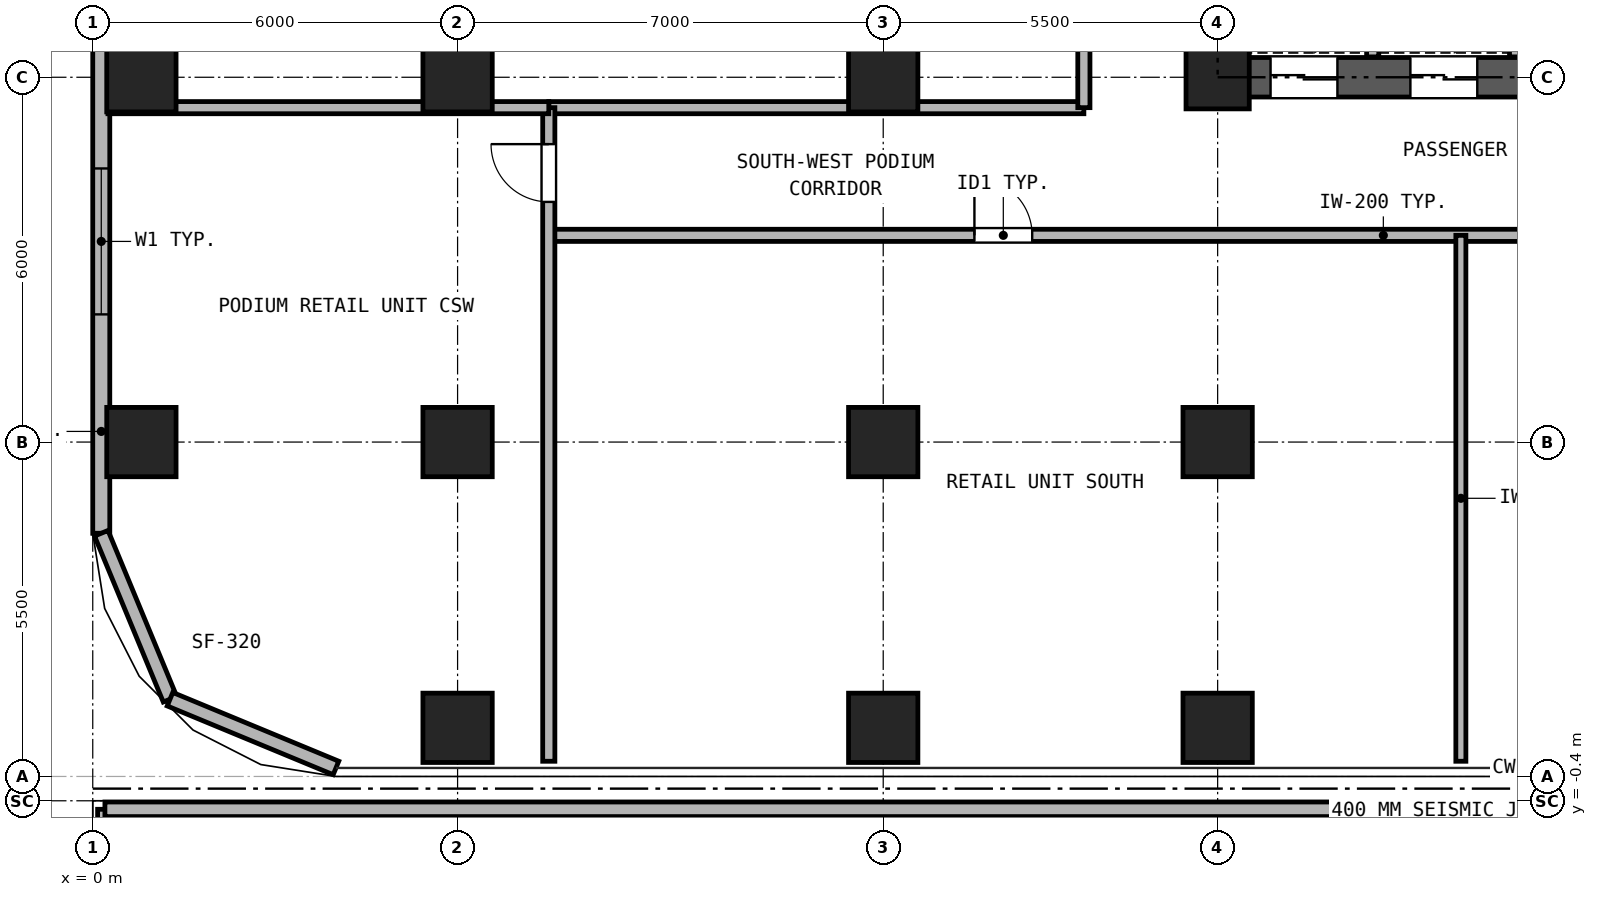
"""IFC4 building model, lengths in metres.
Left out: names, types, materials, properties, quantities, classifications, styles, units other than length and angle.
Written with IfcOpenShell. Run it as: python <this file> out.ifc"""

import sys

from ifc_helpers import new_model, si_unit, direction, frame, frame_2d, origin, origin_2d, place, context, subcontext, project, spatial, rectangle, hollow_rectangle, extrude, source, transform, mapped, element, fill, save


model = new_model("IFC4")
c1 = context("Model", 3, precision=1e-05, world=origin(), true_north=direction((0.0, 1.0)))
c2 = subcontext(c1, "Body", "Model", "MODEL_VIEW")
j1 = project(units=[si_unit("LENGTHUNIT", "METRE"), si_unit("PLANEANGLEUNIT", "RADIAN")], contexts=[c1])
p1 = place(None, origin())
s1 = spatial("IfcSite", under=j1, at=p1, CompositionType="ELEMENT")
p2 = place(p1, origin())
s2 = spatial("IfcBuilding", under=s1, at=p2, CompositionType="ELEMENT")
p3 = place(p2, frame((0.0, 0.0, 4.5)))
s3 = spatial("IfcBuildingStorey", under=s2, at=p3, CompositionType="ELEMENT", Elevation=4.5)
m1 = source(origin(), c2, "Body", "SweptSolid", [
    extrude(hollow_rectangle(XDim=1.14, YDim=1.14, WallThickness=0.07, at=origin_2d()), origin(), (0.0, 0.0, 1.0), 4.18),
])
for number, where, z_axis, x_axis in (
    (1, (6.0, 0.8, 0.0), (0.0, 0.0, 1.0), (1.0, 0.0, 0.0)),
    (2, (13.0, 0.8, 0.0), (0.0, 0.0, 1.0), (1.0, 0.0, 0.0)),
    (3, (18.5, 0.8, 0.0), (0.0, 0.0, 1.0), (1.0, 0.0, 0.0)),
    (4, (0.8, 5.5, 0.0), (0.0, 0.0, 1.0), (1.0, 0.0, 0.0)),
    (5, (0.8, 11.5, 0.0), (0.0, 0.0, 1.0), (1.0, 0.0, 0.0)),
    (6, (6.0, 5.5, 0.0), (0.0, 0.0, 1.0), (1.0, 0.0, 0.0)),
    (7, (6.0, 11.5, 0.0), (0.0, 0.0, 1.0), (1.0, 0.0, 0.0)),
    (8, (13.0, 5.5, 0.0), (0.0, 0.0, 1.0), (1.0, 0.0, 0.0)),
    (9, (13.0, 11.5, 0.0), (0.0, 0.0, 1.0), (1.0, 0.0, 0.0)),
    (10, (18.5, 5.5, 0.0), (0.0, 0.0, 1.0), (1.0, 0.0, 0.0)),
):
    element("IfcColumn", number, at=place(p3, frame(where, z_axis=z_axis, x_axis=x_axis)), inside=s3, PredefinedType="COLUMN", context=c2, shape_type="MappedRepresentation", body=[
        mapped(m1, transform((0.0, 0.0, 0.0), x_axis=(1.0, 0.0, 0.0), y_axis=(0.0, 1.0, 0.0), z_axis=(0.0, 0.0, 1.0), scale=1.0)),
    ])
m2 = source(origin(), c2, "Body", "SweptSolid", [
    extrude(hollow_rectangle(XDim=1.04, YDim=1.04, WallThickness=0.065, at=origin_2d()), origin(), (0.0, 0.0, 1.0), 4.18),
])
p4 = place(p3, frame((18.5, 11.5, 0.0), z_axis=(0.0, 0.0, 1.0), x_axis=(1.0, 0.0, 0.0)))
e11 = element("IfcColumn", 11, at=p4, inside=s3, PredefinedType="COLUMN", context=c2, shape_type="MappedRepresentation", body=[
    mapped(m2, transform((0.0, 0.0, 0.0), x_axis=(1.0, 0.0, 0.0), y_axis=(0.0, 1.0, 0.0), z_axis=(0.0, 0.0, 1.0), scale=1.0)),
])
p5 = place(p3, frame((0.14, 4.0, 0.0), z_axis=(0.0, 0.0, 1.0), x_axis=(0.0, 1.0, 0.0)))
e12 = element("IfcWall", 12, at=p5, inside=s3, PredefinedType="SOLIDWALL", context=c2, shape_type="SweptSolid", body=[
    extrude(rectangle(XDim=32.5, YDim=0.28, at=frame_2d((16.25, 0.0))), origin(), (0.0, 0.0, 1.0), 4.18),
])
p6 = place(p5, frame((3.6, 0.0, 0.9)))
e13 = element("IfcOpeningElement", 13, at=p6, cuts=e12, PredefinedType="OPENING", context=c2, shape_type="SweptSolid", body=[
    extrude(rectangle(XDim=2.4, YDim=2.1, at=frame_2d((1.2, 1.05))), frame((0.0, 0.15, 0.0), z_axis=(0.0, -1.0, 0.0), x_axis=(1.0, 0.0, 0.0)), (0.0, 0.0, 1.0), 0.3),
])
p7 = place(p5, frame((9.8, 0.0, 0.9)))
e14 = element("IfcOpeningElement", 14, at=p7, cuts=e12, PredefinedType="OPENING", context=c2, shape_type="SweptSolid", body=[
    extrude(rectangle(XDim=2.4, YDim=2.1, at=frame_2d((1.2, 1.05))), frame((0.0, 0.15, 0.0), z_axis=(0.0, -1.0, 0.0), x_axis=(1.0, 0.0, 0.0)), (0.0, 0.0, 1.0), 0.3),
])
p8 = place(p5, frame((15.4, 0.0, 0.9)))
e15 = element("IfcOpeningElement", 15, at=p8, cuts=e12, PredefinedType="OPENING", context=c2, shape_type="SweptSolid", body=[
    extrude(rectangle(XDim=2.4, YDim=2.1, at=frame_2d((1.2, 1.05))), frame((0.0, 0.15, 0.0), z_axis=(0.0, -1.0, 0.0), x_axis=(1.0, 0.0, 0.0)), (0.0, 0.0, 1.0), 0.3),
])
p9 = place(p5, frame((21.2, 0.0, 0.9)))
e16 = element("IfcOpeningElement", 16, at=p9, cuts=e12, PredefinedType="OPENING", context=c2, shape_type="SweptSolid", body=[
    extrude(rectangle(XDim=2.4, YDim=2.1, at=frame_2d((1.2, 1.05))), frame((0.0, 0.15, 0.0), z_axis=(0.0, -1.0, 0.0), x_axis=(1.0, 0.0, 0.0)), (0.0, 0.0, 1.0), 0.3),
])
p10 = place(p5, frame((26.8, 0.0, 0.9)))
e17 = element("IfcOpeningElement", 17, at=p10, cuts=e12, PredefinedType="OPENING", context=c2, shape_type="SweptSolid", body=[
    extrude(rectangle(XDim=2.4, YDim=2.1, at=frame_2d((1.2, 1.05))), frame((0.0, 0.15, 0.0), z_axis=(0.0, -1.0, 0.0), x_axis=(1.0, 0.0, 0.0)), (0.0, 0.0, 1.0), 0.3),
])
for number, where, z_axis, x_axis in (
    (18, (0.14, 4.0, 0.0), (0.0, 0.0, 1.0), (0.383, -0.924, 0.0)),
    (19, (1.271, 1.271, 0.0), (0.0, 0.0, 1.0), (0.924, -0.383, 0.0)),
):
    element("IfcWall", number, at=place(p3, frame(where, z_axis=z_axis, x_axis=x_axis)), inside=s3, PredefinedType="SOLIDWALL", context=c2, shape_type="SweptSolid", body=[
        extrude(rectangle(XDim=2.954, YDim=0.24, at=frame_2d((1.477, 0.0))), origin(), (0.0, 0.0, 1.0), 4.18),
    ])
p11 = place(p3, frame((0.2, -10.95, 0.0), z_axis=(0.0, 0.0, 1.0), x_axis=(0.0, 1.0, 0.0)))
e20 = element("IfcWall", 20, at=p11, inside=s3, PredefinedType="SOLIDWALL", context=c2, shape_type="SweptSolid", body=[
    extrude(rectangle(XDim=10.41, YDim=0.24, at=frame_2d((5.205, 0.0))), origin(), (0.0, 0.0, 1.0), 4.18),
])
p12 = place(p3, frame((0.2, -0.54, 0.0), z_axis=(0.0, 0.0, 1.0), x_axis=(1.0, 0.0, 0.0)))
e21 = element("IfcWall", 21, at=p12, inside=s3, PredefinedType="SOLIDWALL", context=c2, shape_type="SweptSolid", body=[
    extrude(rectangle(XDim=47.34, YDim=0.24, at=frame_2d((23.67, 0.0))), origin(), (0.0, 0.0, 1.0), 4.18),
])
p13 = place(p3, frame((18.175, 11.5, 0.0), z_axis=(0.0, 0.0, 1.0), x_axis=(1.0, 0.0, 0.0)))
e22 = element("IfcWall", 22, at=p13, inside=s3, PredefinedType="SHEAR", context=c2, shape_type="SweptSolid", body=[
    extrude(rectangle(XDim=10.65, YDim=0.65, at=frame_2d((5.325, 0.0))), origin(), (0.0, 0.0, 1.0), 4.18),
])
p14 = place(p13, frame((1.195, 0.0, 0.0)))
e23 = element("IfcOpeningElement", 23, at=p14, cuts=e22, PredefinedType="OPENING", context=c2, shape_type="SweptSolid", body=[
    extrude(rectangle(XDim=1.1, YDim=2.25, at=frame_2d((0.55, 1.125))), frame((0.0, 0.335, 0.0), z_axis=(0.0, -1.0, 0.0), x_axis=(1.0, 0.0, 0.0)), (0.0, 0.0, 1.0), 0.67),
])
p15 = place(p13, frame((3.495, 0.0, 0.0)))
e24 = element("IfcOpeningElement", 24, at=p15, cuts=e22, PredefinedType="OPENING", context=c2, shape_type="SweptSolid", body=[
    extrude(rectangle(XDim=1.1, YDim=2.25, at=frame_2d((0.55, 1.125))), frame((0.0, 0.335, 0.0), z_axis=(0.0, -1.0, 0.0), x_axis=(1.0, 0.0, 0.0)), (0.0, 0.0, 1.0), 0.67),
])
p16 = place(p13, frame((5.925, 0.0, 0.0)))
e25 = element("IfcOpeningElement", 25, at=p16, cuts=e22, PredefinedType="OPENING", context=c2, shape_type="SweptSolid", body=[
    extrude(rectangle(XDim=1.1, YDim=2.25, at=frame_2d((0.55, 1.125))), frame((0.0, 0.335, 0.0), z_axis=(0.0, -1.0, 0.0), x_axis=(1.0, 0.0, 0.0)), (0.0, 0.0, 1.0), 0.67),
])
p17 = place(p13, frame((8.325, 0.0, 0.0)))
e26 = element("IfcOpeningElement", 26, at=p17, cuts=e22, PredefinedType="OPENING", context=c2, shape_type="SweptSolid", body=[
    extrude(rectangle(XDim=1.1, YDim=2.25, at=frame_2d((0.55, 1.125))), frame((0.0, 0.335, 0.0), z_axis=(0.0, -1.0, 0.0), x_axis=(1.0, 0.0, 0.0)), (0.0, 0.0, 1.0), 0.67),
])
p18 = place(p3, frame((18.5, 11.825, 0.0), z_axis=(0.0, 0.0, 1.0), x_axis=(0.0, 1.0, 0.0)))
e27 = element("IfcWall", 27, at=p18, inside=s3, PredefinedType="SHEAR", context=c2, shape_type="SweptSolid", body=[
    extrude(rectangle(XDim=16.6, YDim=0.65, at=frame_2d((8.3, 0.0))), origin(), (0.0, 0.0, 1.0), 4.18),
])
p19 = place(p18, frame((7.325, 0.0, 0.0)))
e28 = element("IfcOpeningElement", 28, at=p19, cuts=e27, PredefinedType="OPENING", context=c2, shape_type="SweptSolid", body=[
    extrude(rectangle(XDim=1.15, YDim=2.2, at=frame_2d((0.575, 1.1))), frame((0.0, 0.335, 0.0), z_axis=(0.0, -1.0, 0.0), x_axis=(1.0, 0.0, 0.0)), (0.0, 0.0, 1.0), 0.67),
])
for number, where, z_axis, x_axis in (
    (29, (21.05, 11.835, 0.0), (0.0, 0.0, 1.0), (0.0, 1.0, 0.0)),
    (30, (23.4, 11.835, 0.0), (0.0, 0.0, 1.0), (0.0, 1.0, 0.0)),
):
    element("IfcWall", number, at=place(p3, frame(where, z_axis=z_axis, x_axis=x_axis)), inside=s3, PredefinedType="PARTITIONING", context=c2, shape_type="SweptSolid", body=[
        extrude(rectangle(XDim=3.165, YDim=0.2, at=frame_2d((1.583, 0.0))), origin(), (0.0, 0.0, 1.0), 4.18),
    ])
p20 = place(p3, frame((7.5, 8.9, 0.0), z_axis=(0.0, 0.0, 1.0), x_axis=(1.0, 0.0, 0.0)))
e31 = element("IfcWall", 31, at=p20, inside=s3, PredefinedType="PARTITIONING", context=c2, shape_type="SweptSolid", body=[
    extrude(rectangle(XDim=32.0, YDim=0.2, at=frame_2d((16.0, 0.0))), origin(), (0.0, 0.0, 1.0), 4.18),
])
p21 = place(p20, frame((7.0, 0.0, 0.0)))
e32 = element("IfcOpeningElement", 32, at=p21, cuts=e31, PredefinedType="OPENING", context=c2, shape_type="SweptSolid", body=[
    extrude(rectangle(XDim=0.95, YDim=2.15, at=frame_2d((0.475, 1.075))), frame((0.0, 0.11, 0.0), z_axis=(0.0, -1.0, 0.0), x_axis=(1.0, 0.0, 0.0)), (0.0, 0.0, 1.0), 0.22),
])
p22 = place(p20, frame((19.5, 0.0, 0.0)))
e33 = element("IfcOpeningElement", 33, at=p22, cuts=e31, PredefinedType="OPENING", context=c2, shape_type="SweptSolid", body=[
    extrude(rectangle(XDim=0.95, YDim=2.15, at=frame_2d((0.475, 1.075))), frame((0.0, 0.11, 0.0), z_axis=(0.0, -1.0, 0.0), x_axis=(1.0, 0.0, 0.0)), (0.0, 0.0, 1.0), 0.22),
])
p23 = place(p20, frame((26.35, 0.0, 0.0)))
e34 = element("IfcOpeningElement", 34, at=p23, cuts=e31, PredefinedType="OPENING", context=c2, shape_type="SweptSolid", body=[
    extrude(rectangle(XDim=0.92, YDim=2.1, at=frame_2d((0.46, 1.05))), frame((0.0, 0.11, 0.0), z_axis=(0.0, -1.0, 0.0), x_axis=(1.0, 0.0, 0.0)), (0.0, 0.0, 1.0), 0.22),
])
p24 = place(p20, frame((29.85, 0.0, 0.0)))
e35 = element("IfcOpeningElement", 35, at=p24, cuts=e31, PredefinedType="OPENING", context=c2, shape_type="SweptSolid", body=[
    extrude(rectangle(XDim=0.92, YDim=2.1, at=frame_2d((0.46, 1.05))), frame((0.0, 0.11, 0.0), z_axis=(0.0, -1.0, 0.0), x_axis=(1.0, 0.0, 0.0)), (0.0, 0.0, 1.0), 0.22),
])
p25 = place(p3, frame((7.5, 11.0, 0.0), z_axis=(0.0, 0.0, 1.0), x_axis=(1.0, 0.0, 0.0)))
e36 = element("IfcWall", 36, at=p25, inside=s3, PredefinedType="PARTITIONING", context=c2, shape_type="SweptSolid", body=[
    extrude(rectangle(XDim=8.8, YDim=0.2, at=frame_2d((4.4, 0.0))), origin(), (0.0, 0.0, 1.0), 4.18),
])
p26 = place(p3, frame((16.3, 11.0, 0.0), z_axis=(0.0, 0.0, 1.0), x_axis=(0.0, 1.0, 0.0)))
e37 = element("IfcWall", 37, at=p26, inside=s3, PredefinedType="PARTITIONING", context=c2, shape_type="SweptSolid", body=[
    extrude(rectangle(XDim=18.25, YDim=0.2, at=frame_2d((9.125, 0.0))), origin(), (0.0, 0.0, 1.0), 4.18),
])
p27 = place(p26, frame((4.25, 0.0, 0.0)))
e38 = element("IfcOpeningElement", 38, at=p27, cuts=e37, PredefinedType="OPENING", context=c2, shape_type="SweptSolid", body=[
    extrude(rectangle(XDim=0.95, YDim=2.15, at=frame_2d((0.475, 1.075))), frame((0.0, 0.11, 0.0), z_axis=(0.0, -1.0, 0.0), x_axis=(1.0, 0.0, 0.0)), (0.0, 0.0, 1.0), 0.22),
])
p28 = place(p26, frame((13.375, 0.0, 0.0)))
e39 = element("IfcOpeningElement", 39, at=p28, cuts=e37, PredefinedType="OPENING", context=c2, shape_type="SweptSolid", body=[
    extrude(rectangle(XDim=0.95, YDim=2.15, at=frame_2d((0.475, 1.075))), frame((0.0, 0.11, 0.0), z_axis=(0.0, -1.0, 0.0), x_axis=(1.0, 0.0, 0.0)), (0.0, 0.0, 1.0), 0.22),
])
p29 = place(p3, frame((7.5, 0.25, 0.0), z_axis=(0.0, 0.0, 1.0), x_axis=(0.0, 1.0, 0.0)))
e40 = element("IfcWall", 40, at=p29, inside=s3, PredefinedType="PARTITIONING", context=c2, shape_type="SweptSolid", body=[
    extrude(rectangle(XDim=10.75, YDim=0.2, at=frame_2d((5.375, 0.0))), origin(), (0.0, 0.0, 1.0), 4.18),
])
p30 = place(p29, frame((9.2, 0.0, 0.0)))
e41 = element("IfcOpeningElement", 41, at=p30, cuts=e40, PredefinedType="OPENING", context=c2, shape_type="SweptSolid", body=[
    extrude(rectangle(XDim=0.95, YDim=2.15, at=frame_2d((0.475, 1.075))), frame((0.0, 0.11, 0.0), z_axis=(0.0, -1.0, 0.0), x_axis=(1.0, 0.0, 0.0)), (0.0, 0.0, 1.0), 0.22),
])
p31 = place(p3, frame((0.25, 11.0, 0.0), z_axis=(0.0, 0.0, 1.0), x_axis=(1.0, 0.0, 0.0)))
e42 = element("IfcWall", 42, at=p31, inside=s3, PredefinedType="PARTITIONING", context=c2, shape_type="SweptSolid", body=[
    extrude(rectangle(XDim=7.25, YDim=0.2, at=frame_2d((3.625, 0.0))), origin(), (0.0, 0.0, 1.0), 4.18),
])
p32 = place(p3, frame((22.5, 0.25, 0.0), z_axis=(0.0, 0.0, 1.0), x_axis=(0.0, 1.0, 0.0)))
e43 = element("IfcWall", 43, at=p32, inside=s3, PredefinedType="PARTITIONING", context=c2, shape_type="SweptSolid", body=[
    extrude(rectangle(XDim=8.65, YDim=0.165, at=frame_2d((4.325, 0.0))), origin(), (0.0, 0.0, 1.0), 4.18),
])
p33 = place(p6, origin())
e44 = element("IfcWindow", 44, at=p33, inside=s3, PartitioningType="SINGLE_PANEL", PredefinedType="WINDOW", context=c2, shape_type="SweptSolid", body=[
    extrude(rectangle(XDim=2.4, YDim=2.1, at=frame_2d((1.2, 1.05))), frame((0.0, 0.03, 0.0), z_axis=(0.0, -1.0, 0.0), x_axis=(1.0, 0.0, 0.0)), (0.0, 0.0, 1.0), 0.06),
])
fill(e13, e44)
p34 = place(p14, frame((1.1, 0.0, 0.0), z_axis=(0.0, 0.0, 1.0), x_axis=(-1.0, 0.0, 0.0)))
e45 = element("IfcDoor", 45, at=p34, inside=s3, OperationType="DOUBLE_DOOR_SLIDING", PredefinedType="DOOR", context=c2, shape_type="SweptSolid", body=[
    extrude(rectangle(XDim=1.1, YDim=2.25, at=frame_2d((0.55, 1.125))), frame((0.0, 0.025, 0.0), z_axis=(0.0, -1.0, 0.0), x_axis=(1.0, 0.0, 0.0)), (0.0, 0.0, 1.0), 0.05),
])
fill(e23, e45)
p35 = place(p15, frame((1.1, 0.0, 0.0), z_axis=(0.0, 0.0, 1.0), x_axis=(-1.0, 0.0, 0.0)))
e46 = element("IfcDoor", 46, at=p35, inside=s3, OperationType="DOUBLE_DOOR_SLIDING", PredefinedType="DOOR", context=c2, shape_type="SweptSolid", body=[
    extrude(rectangle(XDim=1.1, YDim=2.25, at=frame_2d((0.55, 1.125))), frame((0.0, 0.025, 0.0), z_axis=(0.0, -1.0, 0.0), x_axis=(1.0, 0.0, 0.0)), (0.0, 0.0, 1.0), 0.05),
])
fill(e24, e46)
p36 = place(p21, frame((0.95, 0.0, 0.0), z_axis=(0.0, 0.0, 1.0), x_axis=(-1.0, 0.0, 0.0)))
e47 = element("IfcDoor", 47, at=p36, inside=s3, OperationType="SINGLE_SWING_LEFT", PredefinedType="DOOR", context=c2, shape_type="SweptSolid", body=[
    extrude(rectangle(XDim=0.95, YDim=2.15, at=frame_2d((0.475, 1.075))), frame((0.0, 0.025, 0.0), z_axis=(0.0, -1.0, 0.0), x_axis=(1.0, 0.0, 0.0)), (0.0, 0.0, 1.0), 0.05),
])
fill(e32, e47)
p37 = place(p30, frame((0.95, 0.0, 0.0), z_axis=(0.0, 0.0, 1.0), x_axis=(-1.0, 0.0, 0.0)))
e48 = element("IfcDoor", 48, at=p37, inside=s3, OperationType="SINGLE_SWING_RIGHT", PredefinedType="DOOR", context=c2, shape_type="SweptSolid", body=[
    extrude(rectangle(XDim=0.95, YDim=2.15, at=frame_2d((0.475, 1.075))), frame((0.0, 0.025, 0.0), z_axis=(0.0, -1.0, 0.0), x_axis=(1.0, 0.0, 0.0)), (0.0, 0.0, 1.0), 0.05),
])
fill(e41, e48)
save(model, sys.argv[1])
